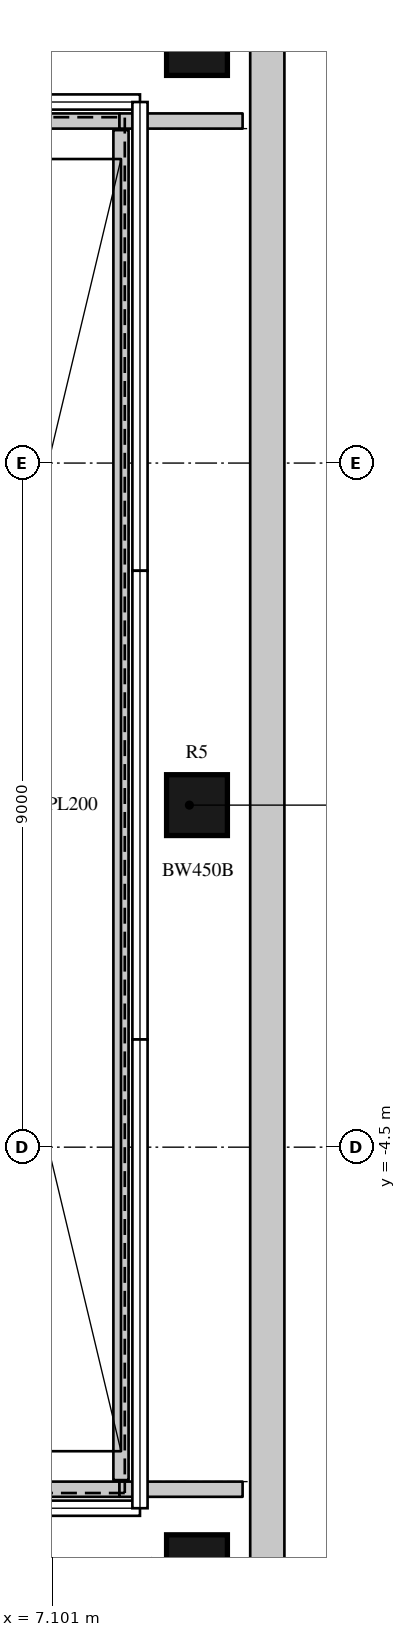
"""IFC4 building model, lengths in metres.
Left out: names, types, materials, properties, quantities, classifications, styles, units other than length and angle.
Written with IfcOpenShell. Run it as: python <this file> out.ifc"""

import sys

from ifc_helpers import new_model, si_unit, direction, frame, frame_2d, origin, origin_2d, place, context, subcontext, project, spatial, rectangle, circle, extrude, element, save


model = new_model("IFC4")
c1 = context("Model", 3, precision=1e-05, world=origin(), true_north=direction((0.0, 1.0)))
c2 = subcontext(c1, "Body", "Model", "MODEL_VIEW")
j1 = project(units=[si_unit("LENGTHUNIT", "METRE"), si_unit("PLANEANGLEUNIT", "RADIAN")], contexts=[c1])
p1 = place(None, origin())
s1 = spatial("IfcSite", under=j1, at=p1, CompositionType="ELEMENT")
p2 = place(p1, origin())
s2 = spatial("IfcBuilding", under=s1, at=p2, CompositionType="ELEMENT")
p3 = place(p2, frame((0.0, 0.0, 355.0)))
s3 = spatial("IfcBuildingStorey", under=s2, at=p3, CompositionType="ELEMENT", Elevation=355.0)
for number, where, z_axis, x_axis in (
    (1, (9.0, -10.0, 0.0), (0.0, 0.0, 1.0), (1.0, 0.0, 0.0)),
    (2, (9.0, 0.0, 0.0), (0.0, 0.0, 1.0), (1.0, 0.0, 0.0)),
    (3, (9.0, 10.0, 0.0), (0.0, 0.0, 1.0), (1.0, 0.0, 0.0)),
):
    element("IfcColumn", number, at=place(p3, frame(where, z_axis=z_axis, x_axis=x_axis)), inside=s3, PredefinedType="COLUMN", context=c2, shape_type="SweptSolid", body=[
        extrude(circle(Radius=0.4, at=origin_2d()), origin(), (0.0, 0.0, 1.0), 4.0),
    ])
p4 = place(p3, frame((9.925, -12.99, 0.0), z_axis=(0.0, 0.0, 1.0), x_axis=(0.0, 1.0, 0.0)))
e4 = element("IfcWall", 4, at=p4, inside=s3, PredefinedType="SOLIDWALL", context=c2, shape_type="SweptSolid", body=[
    extrude(rectangle(XDim=24.229, YDim=0.45, at=frame_2d((12.115, 0.0))), origin(), (0.0, 0.0, 1.0), 4.0),
])
p5 = place(p3, frame((-11.699, 9.0, 0.0), z_axis=(0.0, 0.0, 1.0), x_axis=(1.0, 0.0, 0.0)))
e5 = element("IfcWall", 5, at=p5, inside=s3, PredefinedType="PARTITIONING", context=c2, shape_type="SweptSolid", body=[
    extrude(rectangle(XDim=19.679, YDim=0.2, at=frame_2d((9.839, 0.0))), origin(), (0.0, 0.0, 1.0), 3.548),
])
p6 = place(p3, frame((-5.98, -9.0, 0.0), z_axis=(0.0, 0.0, 1.0), x_axis=(1.0, 0.0, 0.0)))
e6 = element("IfcWall", 6, at=p6, inside=s3, PredefinedType="PARTITIONING", context=c2, shape_type="SweptSolid", body=[
    extrude(rectangle(XDim=13.96, YDim=0.2, at=frame_2d((6.98, 0.0))), origin(), (0.0, 0.0, 1.0), 3.548),
])
for number, where, z_axis, x_axis in (
    (7, (7.98, -9.0, 0.0), (0.0, 0.0, 1.0), (1.0, 0.0, 0.0)),
    (8, (7.98, 9.0, 0.0), (0.0, 0.0, 1.0), (1.0, 0.0, 0.0)),
):
    element("IfcWall", number, at=place(p3, frame(where, z_axis=z_axis, x_axis=x_axis)), inside=s3, PredefinedType="PARTITIONING", context=c2, shape_type="SweptSolid", body=[
        extrude(rectangle(XDim=1.62, YDim=0.2, at=frame_2d((0.81, 0.0))), origin(), (0.0, 0.0, 1.0), 3.548),
    ])
p7 = place(p3, frame((8.0, -8.88, 0.0), z_axis=(0.0, 0.0, 1.0), x_axis=(0.0, 1.0, 0.0)))
e9 = element("IfcWall", 9, at=p7, inside=s3, PredefinedType="PARTITIONING", context=c2, shape_type="SweptSolid", body=[
    extrude(rectangle(XDim=17.76, YDim=0.2, at=frame_2d((8.88, 0.0))), origin(), (0.0, 0.0, 1.0), 3.548),
])
p8 = place(p2, frame((0.0, 0.0, 359.0)))
p9 = place(p8, frame((0.0, 0.0, -0.45)))
p10 = place(p9, frame((5.967, 0.0, 0.0)))
p11 = place(p10, frame((0.0, 0.0, 0.4)))
e10 = element("IfcWindow", 10, at=p11, inside=s3, PartitioningType="SINGLE_PANEL", PredefinedType="SKYLIGHT", context=c2, shape_type="SweptSolid", body=[
    extrude(rectangle(XDim=4.067, YDim=17.0, at=origin_2d()), origin(), (0.0, 0.0, 1.0), 0.05),
])
save(model, sys.argv[1])
